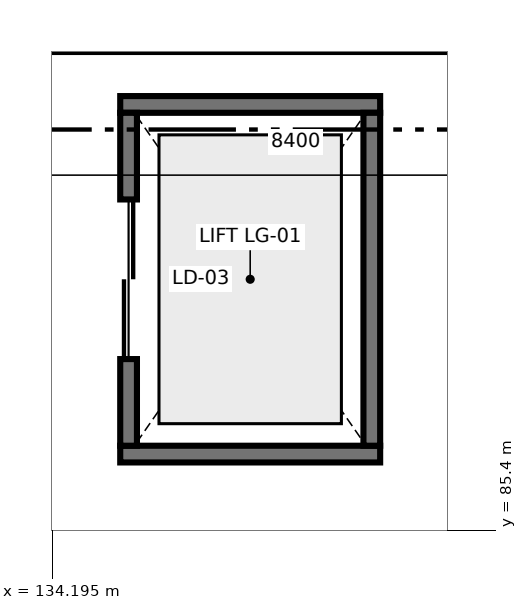
"""IFC4 building model, lengths in metres.
Left out: names, types, materials, properties, quantities, classifications, styles, units other than length and angle.
Written with IfcOpenShell. Run it as: python <this file> out.ifc"""

import sys

from ifc_helpers import new_model, si_unit, direction, frame, frame_2d, origin, place, context, subcontext, project, spatial, rectangle, extrude, element, fill, save


model = new_model("IFC4")
c1 = context("Model", 3, precision=1e-05, world=origin(), true_north=direction((0.0, 1.0)))
c2 = subcontext(c1, "Body", "Model", "MODEL_VIEW")
j1 = project(units=[si_unit("LENGTHUNIT", "METRE"), si_unit("PLANEANGLEUNIT", "RADIAN")], contexts=[c1])
p1 = place(None, origin())
s1 = spatial("IfcSite", under=j1, at=p1, CompositionType="ELEMENT")
p2 = place(p1, origin())
s2 = spatial("IfcBuilding", under=s1, at=p2, CompositionType="ELEMENT")
p3 = place(p2, frame((0.0, 0.0, -5.4)))
s3 = spatial("IfcBuildingStorey", under=s2, at=p3, CompositionType="ELEMENT", Elevation=-5.4)
for number, where, z_axis, x_axis in (
    (1, (135.09, 86.4, 0.0), (0.0, 0.0, 1.0), (1.0, 0.0, 0.0)),
    (2, (135.09, 91.0, 0.0), (0.0, 0.0, 1.0), (1.0, 0.0, 0.0)),
):
    element("IfcWall", number, at=place(p3, frame(where, z_axis=z_axis, x_axis=x_axis)), inside=s3, PredefinedType="SHEAR", context=c2, shape_type="SweptSolid", body=[
        extrude(rectangle(XDim=3.42, YDim=0.22, at=frame_2d((1.71, 0.0))), origin(), (0.0, 0.0, 1.0), 5.1),
    ])
p4 = place(p3, frame((135.2, 86.51, 0.0), z_axis=(0.0, 0.0, 1.0), x_axis=(0.0, 1.0, 0.0)))
e3 = element("IfcWall", 3, at=p4, inside=s3, PredefinedType="SHEAR", context=c2, shape_type="SweptSolid", body=[
    extrude(rectangle(XDim=4.38, YDim=0.22, at=frame_2d((2.19, 0.0))), origin(), (0.0, 0.0, 1.0), 5.1),
])
p5 = place(p4, frame((1.14, 0.0, 0.0)))
e4 = element("IfcOpeningElement", 4, at=p5, cuts=e3, PredefinedType="OPENING", context=c2, shape_type="SweptSolid", body=[
    extrude(rectangle(XDim=2.1, YDim=2.45, at=frame_2d((1.05, 1.225))), frame((0.0, 0.12, 0.0), z_axis=(0.0, -1.0, 0.0), x_axis=(1.0, 0.0, 0.0)), (0.0, 0.0, 1.0), 0.24),
])
p6 = place(p3, frame((138.4, 86.51, 0.0), z_axis=(0.0, 0.0, 1.0), x_axis=(0.0, 1.0, 0.0)))
e5 = element("IfcWall", 5, at=p6, inside=s3, PredefinedType="SHEAR", context=c2, shape_type="SweptSolid", body=[
    extrude(rectangle(XDim=4.38, YDim=0.22, at=frame_2d((2.19, 0.0))), origin(), (0.0, 0.0, 1.0), 5.1),
])
p7 = place(p5, origin())
e6 = element("IfcDoor", 6, at=p7, inside=s3, OperationType="DOUBLE_DOOR_SLIDING", PredefinedType="DOOR", context=c2, shape_type="SweptSolid", body=[
    extrude(rectangle(XDim=2.1, YDim=2.45, at=frame_2d((1.05, 1.225))), frame((0.0, 0.025, 0.0), z_axis=(0.0, -1.0, 0.0), x_axis=(1.0, 0.0, 0.0)), (0.0, 0.0, 1.0), 0.05),
])
fill(e4, e6)
save(model, sys.argv[1])
